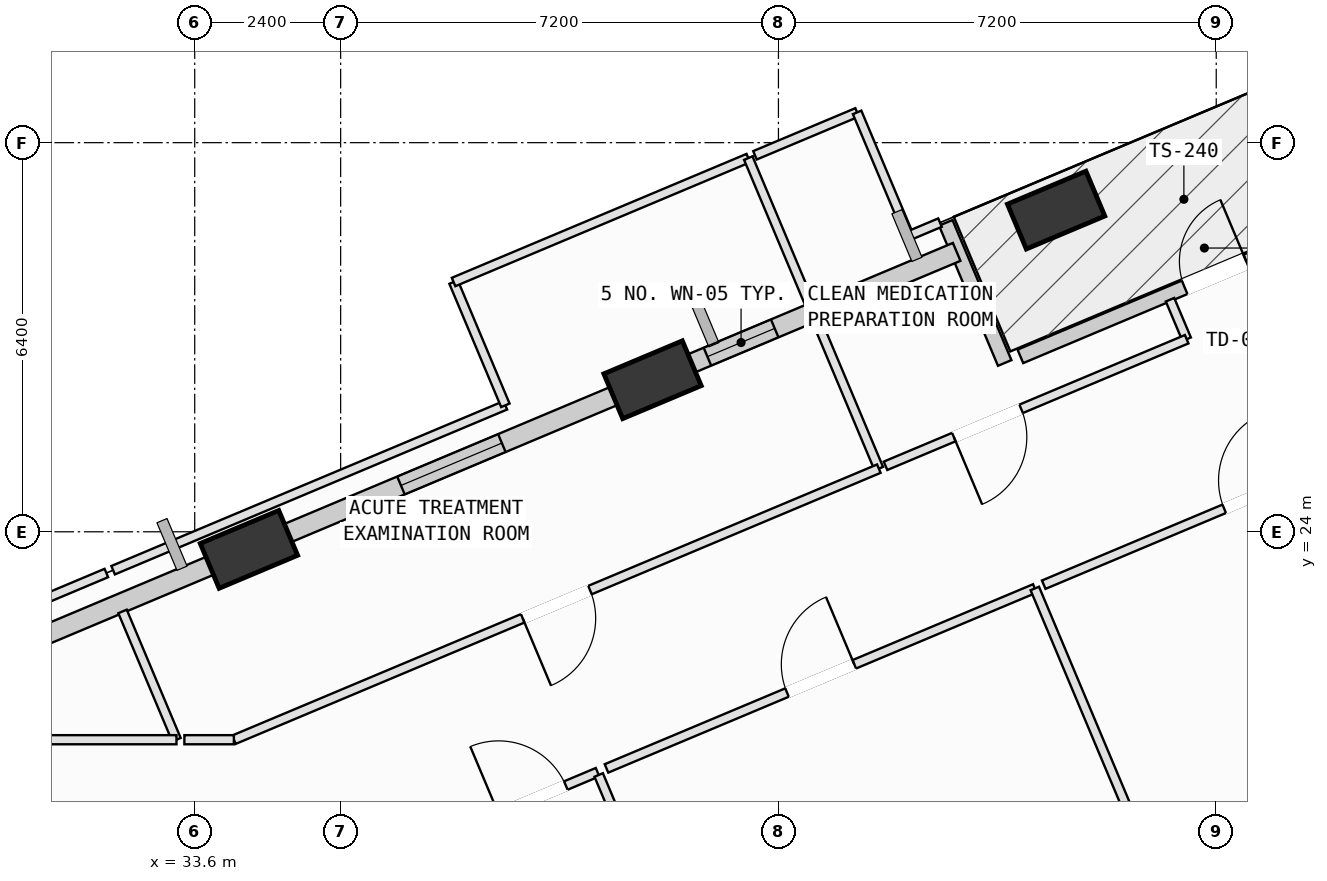
"""IFC4 building model, lengths in metres.
Left out: names, types, materials, properties, quantities, classifications, styles, units other than length and angle.
Written with IfcOpenShell. Run it as: python <this file> out.ifc"""

import sys

from ifc_helpers import new_model, si_unit, direction, frame, frame_2d, origin, origin_2d, place, context, subcontext, project, spatial, rectangle, extrude, element, fill, save


model = new_model("IFC4")
c1 = context("Model", 3, precision=1e-05, world=origin(), true_north=direction((0.0, 1.0)))
c2 = subcontext(c1, "Body", "Model", "MODEL_VIEW")
j1 = project(units=[si_unit("LENGTHUNIT", "METRE"), si_unit("PLANEANGLEUNIT", "RADIAN")], contexts=[c1])
p1 = place(None, origin())
s1 = spatial("IfcSite", under=j1, at=p1, CompositionType="ELEMENT")
p2 = place(p1, origin())
s2 = spatial("IfcBuilding", under=s1, at=p2, CompositionType="ELEMENT")
p3 = place(p2, frame((0.0, 0.0, 120.4)))
s3 = spatial("IfcBuildingStorey", under=s2, at=p3, CompositionType="ELEMENT", Elevation=120.4)
p4 = place(p3, frame((47.767, 29.291, 0.002), z_axis=(-0.019024348299, 0.05847548083, 0.998107555484), x_axis=(-0.756974157796, -0.653010177386, 0.023829239592)))
e1 = element("IfcColumn", 1, at=p4, inside=s3, PredefinedType="COLUMN", context=c2, shape_type="SweptSolid", body=[
    extrude(rectangle(XDim=1.4, YDim=0.8, at=origin_2d()), origin(), (0.0, 0.0, 1.0), 4.004),
])
p5 = place(p3, frame((41.129, 26.501, 0.002), z_axis=(-0.007327178151, 0.031140507143, 0.999488159647), x_axis=(-0.808646535943, -0.588164173362, 0.012396978685)))
e2 = element("IfcColumn", 2, at=p5, inside=s3, PredefinedType="COLUMN", context=c2, shape_type="SweptSolid", body=[
    extrude(rectangle(XDim=1.4, YDim=0.8, at=origin_2d()), origin(), (0.0, 0.0, 1.0), 3.998),
])
p6 = place(p3, frame((34.492, 23.71, 0.002), z_axis=(0.004459574025, 0.003726493364, 0.999983112581), x_axis=(-0.888473565958, 0.458922270897, 0.002252080872)))
e3 = element("IfcColumn", 3, at=p6, inside=s3, PredefinedType="COLUMN", context=c2, shape_type="SweptSolid", body=[
    extrude(rectangle(XDim=1.4, YDim=0.8, at=origin_2d()), origin(), (0.0, 0.0, 1.0), 3.996),
])
p7 = place(p3, frame((47.179, 26.885, 0.0), z_axis=(0.0, 0.0, 1.0), x_axis=(0.921869606689, 0.387500230018, 0.0)))
e4 = element("IfcWall", 4, at=p7, inside=s3, PredefinedType="SOLIDWALL", context=c2, shape_type="SweptSolid", body=[
    extrude(rectangle(XDim=6.96, YDim=0.24, at=frame_2d((3.48, 0.0))), origin(), (0.0, 0.0, 1.0), 2.945),
])
p8 = place(p7, frame((2.93, 0.0, 0.0)))
e5 = element("IfcOpeningElement", 5, at=p8, cuts=e4, PredefinedType="OPENING", context=c2, shape_type="SweptSolid", body=[
    extrude(rectangle(XDim=1.1, YDim=2.15, at=frame_2d((0.55, 1.075))), frame((0.0, 0.13, 0.0), z_axis=(0.0, -1.0, 0.0), x_axis=(1.0, 0.0, 0.0)), (0.0, 0.0, 1.0), 0.26),
])
p9 = place(p3, frame((45.952, 29.081, 0.0), z_axis=(0.0, 0.0, 1.0), x_axis=(0.387498107924, -0.92187049869, 0.0)))
e6 = element("IfcWall", 6, at=p9, inside=s3, PredefinedType="SOLIDWALL", context=c2, shape_type="SweptSolid", body=[
    extrude(rectangle(XDim=2.5, YDim=0.24, at=frame_2d((1.25, 0.0))), origin(), (0.0, 0.0, 1.0), 3.165),
])
p10 = place(p3, frame((41.593, 26.696, 0.0), z_axis=(0.0, 0.0, 1.0), x_axis=(0.921864853688, 0.387511537292, 0.0)))
e7 = element("IfcWall", 7, at=p10, inside=s3, PredefinedType="SOLIDWALL", context=c2, shape_type="SweptSolid", body=[
    extrude(rectangle(XDim=4.923, YDim=0.32, at=frame_2d((2.461, 0.0))), origin(), (0.0, 0.0, 1.0), 3.145),
])
p11 = place(p10, frame((0.477, 0.0, 0.75)))
e8 = element("IfcOpeningElement", 8, at=p11, cuts=e7, PredefinedType="OPENING", context=c2, shape_type="SweptSolid", body=[
    extrude(rectangle(XDim=1.2, YDim=1.75, at=frame_2d((0.6, 0.875))), frame((0.0, 0.17, 0.0), z_axis=(0.0, -1.0, 0.0), x_axis=(1.0, 0.0, 0.0)), (0.0, 0.0, 1.0), 0.34),
])
p12 = place(p3, frame((34.96, 23.907, 0.0), z_axis=(0.0, 0.0, 1.0), x_axis=(0.921853504895, 0.38753853423, 0.0)))
e9 = element("IfcWall", 9, at=p12, inside=s3, PredefinedType="SOLIDWALL", context=c2, shape_type="SweptSolid", body=[
    extrude(rectangle(XDim=6.211, YDim=0.32, at=frame_2d((3.105, 0.0))), origin(), (0.0, 0.0, 1.0), 3.165),
])
p13 = place(p12, frame((2.205, 0.0, 0.75)))
e10 = element("IfcOpeningElement", 10, at=p13, cuts=e9, PredefinedType="OPENING", context=c2, shape_type="SweptSolid", body=[
    extrude(rectangle(XDim=1.8, YDim=2.05, at=frame_2d((0.9, 1.025))), frame((0.0, 0.17, 0.0), z_axis=(0.0, -1.0, 0.0), x_axis=(1.0, 0.0, 0.0)), (0.0, 0.0, 1.0), 0.34),
])
p14 = place(p3, frame((28.55, 21.213, 0.0), z_axis=(0.0, 0.0, 1.0), x_axis=(0.921866530415, 0.387507548444, 0.0)))
e11 = element("IfcWall", 11, at=p14, inside=s3, PredefinedType="SOLIDWALL", context=c2, shape_type="SweptSolid", body=[
    extrude(rectangle(XDim=5.96, YDim=0.32, at=frame_2d((2.98, 0.0))), origin(), (0.0, 0.0, 1.0), 3.165),
])
p15 = place(p3, frame((38.076, 19.142, 0.0), z_axis=(0.0, 0.0, 1.0), x_axis=(0.921804802064, 0.387654365244, 0.0)))
e12 = element("IfcWall", 12, at=p15, inside=s3, PredefinedType="PARTITIONING", context=c2, shape_type="SweptSolid", body=[
    extrude(rectangle(XDim=2.332, YDim=0.15, at=frame_2d((1.166, 0.0))), origin(), (0.0, 0.0, 1.0), 2.945),
])
p16 = place(p15, frame((0.566, 0.0, 0.0)))
e13 = element("IfcOpeningElement", 13, at=p16, cuts=e12, PredefinedType="OPENING", context=c2, shape_type="SweptSolid", body=[
    extrude(rectangle(XDim=1.2, YDim=2.15, at=frame_2d((0.6, 1.075))), frame((0.0, 0.085, 0.0), z_axis=(0.0, -1.0, 0.0), x_axis=(1.0, 0.0, 0.0)), (0.0, 0.0, 1.0), 0.17),
])
p17 = place(p3, frame((40.244, 20.0, 0.0), z_axis=(0.0, 0.0, 1.0), x_axis=(0.387518279995, -0.921862019323, 0.0)))
e14 = element("IfcWall", 14, at=p17, inside=s3, PredefinedType="PARTITIONING", context=c2, shape_type="SweptSolid", body=[
    extrude(rectangle(XDim=15.481, YDim=0.15, at=frame_2d((7.74, 0.0))), origin(), (0.0, 0.0, 1.0), 3.78),
])
p18 = place(p3, frame((40.372, 20.108, 0.0), z_axis=(0.0, 0.0, 1.0), x_axis=(0.921900405163, 0.387426951774, 0.0)))
e15 = element("IfcWall", 15, at=p18, inside=s3, PredefinedType="PARTITIONING", context=c2, shape_type="SweptSolid", body=[
    extrude(rectangle(XDim=7.641, YDim=0.15, at=frame_2d((3.82, 0.0))), origin(), (0.0, 0.0, 1.0), 3.78),
])
p19 = place(p18, frame((3.22, 0.0, 0.0)))
e16 = element("IfcOpeningElement", 16, at=p19, cuts=e15, PredefinedType="OPENING", context=c2, shape_type="SweptSolid", body=[
    extrude(rectangle(XDim=1.2, YDim=2.15, at=frame_2d((0.6, 1.075))), frame((0.0, 0.085, 0.0), z_axis=(0.0, -1.0, 0.0), x_axis=(1.0, 0.0, 0.0)), (0.0, 0.0, 1.0), 0.17),
])
p20 = place(p3, frame((47.416, 23.068, 0.0), z_axis=(0.0, 0.0, 1.0), x_axis=(0.387521386552, -0.921860713429, 0.0)))
e17 = element("IfcWall", 17, at=p20, inside=s3, PredefinedType="PARTITIONING", context=c2, shape_type="SweptSolid", body=[
    extrude(rectangle(XDim=15.53, YDim=0.15, at=frame_2d((7.765, 0.0))), origin(), (0.0, 0.0, 1.0), 3.78),
])
p21 = place(p3, frame((47.563, 23.13, 0.0), z_axis=(0.0, 0.0, 1.0), x_axis=(0.921835553327, 0.387581233579, 0.0)))
e18 = element("IfcWall", 18, at=p21, inside=s3, PredefinedType="PARTITIONING", context=c2, shape_type="SweptSolid", body=[
    extrude(rectangle(XDim=7.64, YDim=0.15, at=frame_2d((3.82, 0.0))), origin(), (0.0, 0.0, 1.0), 3.78),
])
p22 = place(p21, frame((3.22, 0.0, 0.0)))
e19 = element("IfcOpeningElement", 19, at=p22, cuts=e18, PredefinedType="OPENING", context=c2, shape_type="SweptSolid", body=[
    extrude(rectangle(XDim=1.2, YDim=2.15, at=frame_2d((0.6, 1.075))), frame((0.0, 0.085, 0.0), z_axis=(0.0, -1.0, 0.0), x_axis=(1.0, 0.0, 0.0)), (0.0, 0.0, 1.0), 0.17),
])
p23 = place(p3, frame((28.379, 21.737, 0.0), z_axis=(0.0, 0.0, 1.0), x_axis=(0.921774717682, 0.387725895244, 0.0)))
e20 = element("IfcWall", 20, at=p23, inside=s3, PredefinedType="PARTITIONING", context=c2, shape_type="SweptSolid", body=[
    extrude(rectangle(XDim=4.088, YDim=0.15, at=frame_2d((2.044, 0.0))), origin(), (0.0, 0.0, 1.0), 3.78),
])
p24 = place(p3, frame((32.413, 22.69, 0.0), z_axis=(0.0, 0.0, 1.0), x_axis=(0.387537134963, -0.921854093132, 0.0)))
e21 = element("IfcWall", 21, at=p24, inside=s3, PredefinedType="PARTITIONING", context=c2, shape_type="SweptSolid", body=[
    extrude(rectangle(XDim=2.289, YDim=0.15, at=frame_2d((1.145, 0.0))), origin(), (0.0, 0.0, 1.0), 3.78),
])
p25 = place(p3, frame((33.3, 20.58, 0.0), z_axis=(0.0, 0.0, 1.0), x_axis=(-1.0, 0.0, 0.0)))
e22 = element("IfcWall", 22, at=p25, inside=s3, PredefinedType="PARTITIONING", context=c2, shape_type="SweptSolid", body=[
    extrude(rectangle(XDim=4.495, YDim=0.15, at=frame_2d((2.248, 0.0))), origin(), (0.0, 0.0, 1.0), 3.78),
])
p26 = place(p3, frame((32.258, 23.368, 0.0), z_axis=(0.0, 0.0, 1.0), x_axis=(0.921840796655, 0.387568762443, 0.0)))
e23 = element("IfcWall", 23, at=p26, inside=s3, PredefinedType="PARTITIONING", context=c2, shape_type="SweptSolid", body=[
    extrude(rectangle(XDim=6.998, YDim=0.15, at=frame_2d((3.499, 0.0))), origin(), (0.0, 0.0, 1.0), 3.78),
])
p27 = place(p3, frame((38.709, 26.08, 0.0), z_axis=(0.0, 0.0, 1.0), x_axis=(-0.387372119847, 0.921923446261, 0.0)))
e24 = element("IfcWall", 24, at=p27, inside=s3, PredefinedType="PARTITIONING", context=c2, shape_type="SweptSolid", body=[
    extrude(rectangle(XDim=2.199, YDim=0.15, at=frame_2d((1.1, 0.0))), origin(), (0.0, 0.0, 1.0), 3.78),
])
p28 = place(p3, frame((37.857, 28.108, 0.0), z_axis=(0.0, 0.0, 1.0), x_axis=(0.921827538147, 0.387600296587, 0.0)))
e25 = element("IfcWall", 25, at=p28, inside=s3, PredefinedType="PARTITIONING", context=c2, shape_type="SweptSolid", body=[
    extrude(rectangle(XDim=5.258, YDim=0.15, at=frame_2d((2.629, 0.0))), origin(), (0.0, 0.0, 1.0), 3.78),
])
p29 = place(p3, frame((42.704, 30.146, 0.0), z_axis=(0.0, 0.0, 1.0), x_axis=(0.387351522541, -0.921932100529, 0.0)))
e26 = element("IfcWall", 26, at=p29, inside=s3, PredefinedType="PARTITIONING", context=c2, shape_type="SweptSolid", body=[
    extrude(rectangle(XDim=2.615, YDim=0.15, at=frame_2d((1.308, 0.0))), origin(), (0.0, 0.0, 1.0), 3.78),
])
p30 = place(p3, frame((43.822, 27.486, 0.0), z_axis=(0.0, 0.0, 1.0), x_axis=(0.387518501876, -0.921861926052, 0.0)))
e27 = element("IfcWall", 27, at=p30, inside=s3, PredefinedType="PARTITIONING", context=c2, shape_type="SweptSolid", body=[
    extrude(rectangle(XDim=2.656, YDim=0.15, at=frame_2d((1.328, 0.0))), origin(), (0.0, 0.0, 1.0), 3.78),
])
p31 = place(p3, frame((44.851, 25.038, 0.0), z_axis=(0.0, 0.0, 1.0), x_axis=(-0.921889203051, -0.38745360664, 0.0)))
e28 = element("IfcWall", 28, at=p31, inside=s3, PredefinedType="PARTITIONING", context=c2, shape_type="SweptSolid", body=[
    extrude(rectangle(XDim=11.506, YDim=0.15, at=frame_2d((5.753, 0.0))), origin(), (0.0, 0.0, 1.0), 2.945),
])
p32 = place(p31, frame((5.153, 0.0, 0.0)))
e29 = element("IfcOpeningElement", 29, at=p32, cuts=e28, PredefinedType="OPENING", context=c2, shape_type="SweptSolid", body=[
    extrude(rectangle(XDim=1.2, YDim=2.15, at=frame_2d((0.6, 1.075))), frame((0.0, 0.085, 0.0), z_axis=(0.0, -1.0, 0.0), x_axis=(1.0, 0.0, 0.0)), (0.0, 0.0, 1.0), 0.17),
])
p33 = place(p3, frame((34.244, 20.58, 0.0), z_axis=(0.0, 0.0, 1.0), x_axis=(-1.0, 0.0, 0.0)))
e30 = element("IfcWall", 30, at=p33, inside=s3, PredefinedType="PARTITIONING", context=c2, shape_type="SweptSolid", body=[
    extrude(rectangle(XDim=0.814, YDim=0.15, at=frame_2d((0.407, 0.0))), origin(), (0.0, 0.0, 1.0), 3.78),
])
p34 = place(p3, frame((49.64, 27.817, 0.0), z_axis=(0.0, 0.0, 1.0), x_axis=(0.388691323375, -0.921368034573, 0.0)))
e31 = element("IfcWall", 31, at=p34, inside=s3, PredefinedType="PARTITIONING", context=c2, shape_type="SweptSolid", body=[
    extrude(rectangle(XDim=0.705, YDim=0.15, at=frame_2d((0.353, 0.0))), origin(), (0.0, 0.0, 1.0), 3.78),
])
p35 = place(p3, frame((49.914, 27.167, 0.0), z_axis=(0.0, 0.0, 1.0), x_axis=(-0.921867857549, -0.387504391225, 0.0)))
e32 = element("IfcWall", 32, at=p35, inside=s3, PredefinedType="PARTITIONING", context=c2, shape_type="SweptSolid", body=[
    extrude(rectangle(XDim=5.373, YDim=0.15, at=frame_2d((2.687, 0.0))), origin(), (0.0, 0.0, 1.0), 2.945),
])
p36 = place(p35, frame((2.954, 0.0, 0.0)))
e33 = element("IfcOpeningElement", 33, at=p36, cuts=e32, PredefinedType="OPENING", context=c2, shape_type="SweptSolid", body=[
    extrude(rectangle(XDim=1.2, YDim=2.15, at=frame_2d((0.6, 1.075))), frame((0.0, 0.085, 0.0), z_axis=(0.0, -1.0, 0.0), x_axis=(1.0, 0.0, 0.0)), (0.0, 0.0, 1.0), 0.17),
])
p37 = place(p3, frame((42.814, 30.192, 0.0), z_axis=(0.0, 0.0, 1.0), x_axis=(0.921887370227, 0.387457967548, 0.0)))
e34 = element("IfcWall", 34, at=p37, inside=s3, PredefinedType="PARTITIONING", context=c2, shape_type="SweptSolid", body=[
    extrude(rectangle(XDim=1.822, YDim=0.15, at=frame_2d((0.911, 0.0))), origin(), (0.0, 0.0, 1.0), 3.78),
])
p38 = place(p3, frame((44.494, 30.898, 0.0), z_axis=(0.0, 0.0, 1.0), x_axis=(0.387749379691, -0.921764839072, 0.0)))
e35 = element("IfcWall", 35, at=p38, inside=s3, PredefinedType="PARTITIONING", context=c2, shape_type="SweptSolid", body=[
    extrude(rectangle(XDim=2.2, YDim=0.15, at=frame_2d((1.1, 0.0))), origin(), (0.0, 0.0, 1.0), 3.78),
])
p39 = place(p3, frame((45.347, 28.87, 0.0), z_axis=(0.0, 0.0, 1.0), x_axis=(0.921568929159, 0.388214771498, 0.0)))
e36 = element("IfcWall", 36, at=p39, inside=s3, PredefinedType="PARTITIONING", context=c2, shape_type="SweptSolid", body=[
    extrude(rectangle(XDim=0.553, YDim=0.15, at=frame_2d((0.277, 0.0))), origin(), (0.0, 0.0, 1.0), 3.145),
])
p40 = place(p8, origin())
e37 = element("IfcDoor", 37, at=p40, inside=s3, OperationType="SINGLE_SWING_RIGHT", PredefinedType="DOOR", context=c2, shape_type="SweptSolid", body=[
    extrude(rectangle(XDim=1.1, YDim=2.15, at=frame_2d((0.55, 1.075))), frame((0.0, 0.025, 0.0), z_axis=(0.0, -1.0, 0.0), x_axis=(1.0, 0.0, 0.0)), (0.0, 0.0, 1.0), 0.05),
])
fill(e5, e37)
p41 = place(p11, origin())
e38 = element("IfcWindow", 38, at=p41, inside=s3, PartitioningType="SINGLE_PANEL", PredefinedType="WINDOW", context=c2, shape_type="SweptSolid", body=[
    extrude(rectangle(XDim=1.2, YDim=1.75, at=frame_2d((0.6, 0.875))), frame((0.0, 0.03, 0.0), z_axis=(0.0, -1.0, 0.0), x_axis=(1.0, 0.0, 0.0)), (0.0, 0.0, 1.0), 0.06),
])
fill(e8, e38)
p42 = place(p13, origin())
e39 = element("IfcWindow", 39, at=p42, inside=s3, PartitioningType="SINGLE_PANEL", PredefinedType="WINDOW", context=c2, shape_type="SweptSolid", body=[
    extrude(rectangle(XDim=1.8, YDim=2.05, at=frame_2d((0.9, 1.025))), frame((0.0, 0.03, 0.0), z_axis=(0.0, -1.0, 0.0), x_axis=(1.0, 0.0, 0.0)), (0.0, 0.0, 1.0), 0.06),
])
fill(e10, e39)
p43 = place(p16, origin())
e40 = element("IfcDoor", 40, at=p43, inside=s3, OperationType="SINGLE_SWING_LEFT", PredefinedType="DOOR", context=c2, shape_type="SweptSolid", body=[
    extrude(rectangle(XDim=1.2, YDim=2.15, at=frame_2d((0.6, 1.075))), frame((0.0, 0.025, 0.0), z_axis=(0.0, -1.0, 0.0), x_axis=(1.0, 0.0, 0.0)), (0.0, 0.0, 1.0), 0.05),
])
fill(e13, e40)
p44 = place(p19, origin())
e41 = element("IfcDoor", 41, at=p44, inside=s3, OperationType="SINGLE_SWING_RIGHT", PredefinedType="DOOR", context=c2, shape_type="SweptSolid", body=[
    extrude(rectangle(XDim=1.2, YDim=2.15, at=frame_2d((0.6, 1.075))), frame((0.0, 0.025, 0.0), z_axis=(0.0, -1.0, 0.0), x_axis=(1.0, 0.0, 0.0)), (0.0, 0.0, 1.0), 0.05),
])
fill(e16, e41)
p45 = place(p22, origin())
e42 = element("IfcDoor", 42, at=p45, inside=s3, OperationType="SINGLE_SWING_RIGHT", PredefinedType="DOOR", context=c2, shape_type="SweptSolid", body=[
    extrude(rectangle(XDim=1.2, YDim=2.15, at=frame_2d((0.6, 1.075))), frame((0.0, 0.025, 0.0), z_axis=(0.0, -1.0, 0.0), x_axis=(1.0, 0.0, 0.0)), (0.0, 0.0, 1.0), 0.05),
])
fill(e19, e42)
p46 = place(p32, origin())
e43 = element("IfcDoor", 43, at=p46, inside=s3, OperationType="SINGLE_SWING_RIGHT", PredefinedType="DOOR", context=c2, shape_type="SweptSolid", body=[
    extrude(rectangle(XDim=1.2, YDim=2.15, at=frame_2d((0.6, 1.075))), frame((0.0, 0.025, 0.0), z_axis=(0.0, -1.0, 0.0), x_axis=(1.0, 0.0, 0.0)), (0.0, 0.0, 1.0), 0.05),
])
fill(e29, e43)
p47 = place(p36, origin())
e44 = element("IfcDoor", 44, at=p47, inside=s3, OperationType="SINGLE_SWING_RIGHT", PredefinedType="DOOR", context=c2, shape_type="SweptSolid", body=[
    extrude(rectangle(XDim=1.2, YDim=2.15, at=frame_2d((0.6, 1.075))), frame((0.0, 0.025, 0.0), z_axis=(0.0, -1.0, 0.0), x_axis=(1.0, 0.0, 0.0)), (0.0, 0.0, 1.0), 0.05),
])
fill(e33, e44)
save(model, sys.argv[1])
